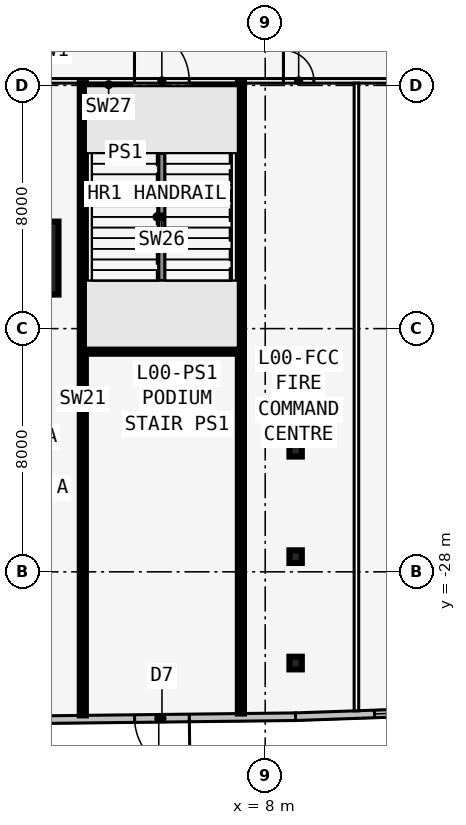
"""IFC4 building model, lengths in metres.
Left out: names, types, materials, properties, quantities, classifications, styles, units other than length and angle.
Written with IfcOpenShell. Run it as: python <this file> out.ifc"""

import sys

from ifc_helpers import new_model, si_unit, direction, frame, frame_2d, origin, origin_2d, place, context, subcontext, project, spatial, rectangle, i_section, extrude, element, fill, save


model = new_model("IFC4")
c1 = context("Model", 3, precision=1e-05, world=origin(), true_north=direction((0.0, 1.0)))
c2 = subcontext(c1, "Body", "Model", "MODEL_VIEW")
j1 = project(units=[si_unit("LENGTHUNIT", "METRE"), si_unit("PLANEANGLEUNIT", "RADIAN")], contexts=[c1])
p1 = place(None, origin())
s1 = spatial("IfcSite", under=j1, at=p1, CompositionType="ELEMENT")
p2 = place(p1, origin())
s2 = spatial("IfcBuilding", under=s1, at=p2, CompositionType="ELEMENT")
p3 = place(p2, origin())
s3 = spatial("IfcBuildingStorey", under=s2, at=p3, CompositionType="ELEMENT", Elevation=0.0)
p4 = place(p3, frame((5.0, -21.521, -0.3), z_axis=(0.0, 0.0, 1.0), x_axis=(0.0, -1.0, 0.0)))
e1 = element("IfcColumn", 1, at=p4, inside=s3, PredefinedType="COLUMN", context=c2, shape_type="SweptSolid", body=[
    extrude(i_section(OverallWidth=0.455, OverallDepth=0.569, WebThickness=0.078, FlangeThickness=0.125, at=origin_2d()), origin(), (0.0, 0.0, 1.0), 6.3),
])
for number, where, z_axis, x_axis in (
    (2, (9.0, -24.0, -0.3), (0.0, 0.0, 1.0), (1.0, 0.0, 0.0)),
    (3, (9.0, -27.5, -0.3), (0.0, 0.0, 1.0), (1.0, 0.0, 0.0)),
    (4, (9.0, -31.0, -0.3), (0.0, 0.0, 1.0), (1.0, 0.0, 0.0)),
):
    element("IfcColumn", number, at=place(p3, frame(where, z_axis=z_axis, x_axis=x_axis)), inside=s3, PredefinedType="COLUMN", context=c2, shape_type="SweptSolid", body=[
        extrude(i_section(OverallWidth=0.406, OverallDepth=0.417, WebThickness=0.03, FlangeThickness=0.048, at=origin_2d()), origin(), (0.0, 0.0, 1.0), 6.3),
    ])
p5 = place(p3, frame((0.0, -17.68, -0.3), z_axis=(0.0, 0.0, 1.0), x_axis=(0.0, -1.0, 0.0)))
e5 = element("IfcColumn", 5, at=p5, inside=s3, PredefinedType="COLUMN", context=c2, shape_type="SweptSolid", body=[
    extrude(rectangle(XDim=2.4, YDim=2.4, at=origin_2d()), origin(), (0.0, 0.0, 1.0), 6.3),
])
p6 = place(p3, frame((8.999, -32.765, -0.3), z_axis=(0.0, 0.0, 1.0), x_axis=(-0.999932292689, -0.011636581857, 0.0)))
e6 = element("IfcWall", 6, at=p6, inside=s3, PredefinedType="STANDARD", context=c2, shape_type="SweptSolid", body=[
    extrude(rectangle(XDim=9.0, YDim=0.25, at=frame_2d((4.5, 0.0))), origin(), (0.0, 0.0, 1.0), 6.05),
])
p7 = place(p6, frame((3.495, 0.0, 0.3)))
e7 = element("IfcOpeningElement", 7, at=p7, cuts=e6, PredefinedType="OPENING", context=c2, shape_type="SweptSolid", body=[
    extrude(rectangle(XDim=1.8, YDim=2.7, at=frame_2d((0.9, 1.35))), frame((0.0, 0.135, 0.0), z_axis=(0.0, -1.0, 0.0), x_axis=(1.0, 0.0, 0.0)), (0.0, 0.0, 1.0), 0.27),
])
p8 = place(p3, frame((8.996, -32.765, -0.3), z_axis=(0.0, 0.0, 1.0), x_axis=(0.999393961522, 0.034809620405, 0.0)))
e8 = element("IfcWall", 8, at=p8, inside=s3, PredefinedType="STANDARD", context=c2, shape_type="SweptSolid", body=[
    extrude(rectangle(XDim=9.005, YDim=0.25, at=frame_2d((4.503, 0.0))), origin(), (0.0, 0.0, 1.0), 6.05),
])
p9 = place(p8, frame((4.536, 0.0, 0.3)))
e9 = element("IfcOpeningElement", 9, at=p9, cuts=e8, PredefinedType="OPENING", context=c2, shape_type="SweptSolid", body=[
    extrude(rectangle(XDim=1.8, YDim=2.7, at=frame_2d((0.9, 1.35))), frame((0.0, 0.135, 0.0), z_axis=(0.0, -1.0, 0.0), x_axis=(1.0, 0.0, 0.0)), (0.0, 0.0, 1.0), 0.27),
])
p10 = place(p8, frame((2.602, 0.0, 1.2)))
e10 = element("IfcOpeningElement", 10, at=p10, cuts=e8, PredefinedType="OPENING", context=c2, shape_type="SweptSolid", body=[
    extrude(rectangle(XDim=1.2, YDim=3.6, at=frame_2d((0.6, 1.8))), frame((0.0, 0.135, 0.0), z_axis=(0.0, -1.0, 0.0), x_axis=(1.0, 0.0, 0.0)), (0.0, 0.0, 1.0), 0.27),
])
p11 = place(p8, frame((7.071, 0.0, 1.2)))
e11 = element("IfcOpeningElement", 11, at=p11, cuts=e8, PredefinedType="OPENING", context=c2, shape_type="SweptSolid", body=[
    extrude(rectangle(XDim=1.2, YDim=3.6, at=frame_2d((0.6, 1.8))), frame((0.0, 0.135, 0.0), z_axis=(0.0, -1.0, 0.0), x_axis=(1.0, 0.0, 0.0)), (0.0, 0.0, 1.0), 0.27),
])
p12 = place(p3, frame((-19.527, -11.851, -0.3), z_axis=(0.0, 0.0, 1.0), x_axis=(1.0, 0.0, 0.0)))
e12 = element("IfcWall", 12, at=p12, inside=s3, PredefinedType="PARTITIONING", context=c2, shape_type="SweptSolid", body=[
    extrude(rectangle(XDim=39.054, YDim=0.15, at=frame_2d((19.527, 0.0))), origin(), (0.0, 0.0, 1.0), 5.108),
])
p13 = place(p12, frame((8.427, 0.0, 0.3)))
e13 = element("IfcOpeningElement", 13, at=p13, cuts=e12, PredefinedType="OPENING", context=c2, shape_type="SweptSolid", body=[
    extrude(rectangle(XDim=1.8, YDim=2.13, at=frame_2d((0.9, 1.065))), frame((0.0, 0.085, 0.0), z_axis=(0.0, -1.0, 0.0), x_axis=(1.0, 0.0, 0.0)), (0.0, 0.0, 1.0), 0.17),
])
p14 = place(p12, frame((18.427, 0.0, 0.3)))
e14 = element("IfcOpeningElement", 14, at=p14, cuts=e12, PredefinedType="OPENING", context=c2, shape_type="SweptSolid", body=[
    extrude(rectangle(XDim=1.8, YDim=2.13, at=frame_2d((0.9, 1.065))), frame((0.0, 0.085, 0.0), z_axis=(0.0, -1.0, 0.0), x_axis=(1.0, 0.0, 0.0)), (0.0, 0.0, 1.0), 0.17),
])
p15 = place(p12, frame((23.227, 0.0, 0.3)))
e15 = element("IfcOpeningElement", 15, at=p15, cuts=e12, PredefinedType="OPENING", context=c2, shape_type="SweptSolid", body=[
    extrude(rectangle(XDim=1.8, YDim=2.13, at=frame_2d((0.9, 1.065))), frame((0.0, 0.085, 0.0), z_axis=(0.0, -1.0, 0.0), x_axis=(1.0, 0.0, 0.0)), (0.0, 0.0, 1.0), 0.17),
])
p16 = place(p12, frame((28.127, 0.0, 0.3)))
e16 = element("IfcOpeningElement", 16, at=p16, cuts=e12, PredefinedType="OPENING", context=c2, shape_type="SweptSolid", body=[
    extrude(rectangle(XDim=1.0, YDim=2.13, at=frame_2d((0.5, 1.065))), frame((0.0, 0.085, 0.0), z_axis=(0.0, -1.0, 0.0), x_axis=(1.0, 0.0, 0.0)), (0.0, 0.0, 1.0), 0.17),
])
p17 = place(p12, frame((33.74, 0.0, 0.3)))
e17 = element("IfcOpeningElement", 17, at=p17, cuts=e12, PredefinedType="OPENING", context=c2, shape_type="SweptSolid", body=[
    extrude(rectangle(XDim=1.8, YDim=2.13, at=frame_2d((0.9, 1.065))), frame((0.0, 0.085, 0.0), z_axis=(0.0, -1.0, 0.0), x_axis=(1.0, 0.0, 0.0)), (0.0, 0.0, 1.0), 0.17),
])
p18 = place(p3, frame((2.0, -11.926, -0.3), z_axis=(0.0, 0.0, 1.0), x_axis=(0.0, -1.0, 0.0)))
e18 = element("IfcWall", 18, at=p18, inside=s3, PredefinedType="SHEAR", context=c2, shape_type="SweptSolid", body=[
    extrude(rectangle(XDim=20.795, YDim=0.2, at=frame_2d((10.397, 0.0))), origin(), (0.0, 0.0, 1.0), 6.3),
])
p19 = place(p3, frame((7.2, -11.926, -0.3), z_axis=(0.0, 0.0, 1.0), x_axis=(0.0, -1.0, 0.0)))
e19 = element("IfcWall", 19, at=p19, inside=s3, PredefinedType="SHEAR", context=c2, shape_type="SweptSolid", body=[
    extrude(rectangle(XDim=20.734, YDim=0.2, at=frame_2d((10.367, 0.0))), origin(), (0.0, 0.0, 1.0), 6.3),
])
p20 = place(p3, frame((11.0, -11.926, -0.3), z_axis=(0.0, 0.0, 1.0), x_axis=(0.0, -1.0, 0.0)))
e20 = element("IfcWall", 20, at=p20, inside=s3, PredefinedType="PARTITIONING", context=c2, shape_type="SweptSolid", body=[
    extrude(rectangle(XDim=20.644, YDim=0.15, at=frame_2d((10.322, 0.0))), origin(), (0.0, 0.0, 1.0), 6.05),
])
p21 = place(p3, frame((20.027, -10.985, -0.3), z_axis=(0.0, 0.0, 1.0), x_axis=(-0.500001677587, 0.866024435227, 0.0)))
e21 = element("IfcWall", 21, at=p21, inside=s3, PredefinedType="PARTITIONING", context=c2, shape_type="SweptSolid", body=[
    extrude(rectangle(XDim=39.054, YDim=0.15, at=frame_2d((19.527, 0.0))), origin(), (0.0, 0.0, 1.0), 5.108),
])
p22 = place(p21, frame((8.427, 0.0, 0.3)))
e22 = element("IfcOpeningElement", 22, at=p22, cuts=e21, PredefinedType="OPENING", context=c2, shape_type="SweptSolid", body=[
    extrude(rectangle(XDim=1.8, YDim=2.13, at=frame_2d((0.9, 1.065))), frame((0.0, 0.085, 0.0), z_axis=(0.0, -1.0, 0.0), x_axis=(1.0, 0.0, 0.0)), (0.0, 0.0, 1.0), 0.17),
])
p23 = place(p21, frame((18.427, 0.0, 0.3)))
e23 = element("IfcOpeningElement", 23, at=p23, cuts=e21, PredefinedType="OPENING", context=c2, shape_type="SweptSolid", body=[
    extrude(rectangle(XDim=1.8, YDim=2.13, at=frame_2d((0.9, 1.065))), frame((0.0, 0.085, 0.0), z_axis=(0.0, -1.0, 0.0), x_axis=(1.0, 0.0, 0.0)), (0.0, 0.0, 1.0), 0.17),
])
p24 = place(p21, frame((23.227, 0.0, 0.3)))
e24 = element("IfcOpeningElement", 24, at=p24, cuts=e21, PredefinedType="OPENING", context=c2, shape_type="SweptSolid", body=[
    extrude(rectangle(XDim=1.8, YDim=2.13, at=frame_2d((0.9, 1.065))), frame((0.0, 0.085, 0.0), z_axis=(0.0, -1.0, 0.0), x_axis=(1.0, 0.0, 0.0)), (0.0, 0.0, 1.0), 0.17),
])
p25 = place(p21, frame((27.627, 0.0, 0.3)))
e25 = element("IfcOpeningElement", 25, at=p25, cuts=e21, PredefinedType="OPENING", context=c2, shape_type="SweptSolid", body=[
    extrude(rectangle(XDim=1.0, YDim=2.13, at=frame_2d((0.5, 1.065))), frame((0.0, 0.085, 0.0), z_axis=(0.0, -1.0, 0.0), x_axis=(1.0, 0.0, 0.0)), (0.0, 0.0, 1.0), 0.17),
])
p26 = place(p21, frame((30.527, 0.0, 0.3)))
e26 = element("IfcOpeningElement", 26, at=p26, cuts=e21, PredefinedType="OPENING", context=c2, shape_type="SweptSolid", body=[
    extrude(rectangle(XDim=1.0, YDim=2.13, at=frame_2d((0.5, 1.065))), frame((0.0, 0.085, 0.0), z_axis=(0.0, -1.0, 0.0), x_axis=(1.0, 0.0, 0.0)), (0.0, 0.0, 1.0), 0.17),
])
p27 = place(p21, frame((33.277, 0.0, 0.3)))
e27 = element("IfcOpeningElement", 27, at=p27, cuts=e21, PredefinedType="OPENING", context=c2, shape_type="SweptSolid", body=[
    extrude(rectangle(XDim=1.0, YDim=2.13, at=frame_2d((0.5, 1.065))), frame((0.0, 0.085, 0.0), z_axis=(0.0, -1.0, 0.0), x_axis=(1.0, 0.0, 0.0)), (0.0, 0.0, 1.0), 0.17),
])
p28 = place(p21, frame((36.39, 0.0, 0.3)))
e28 = element("IfcOpeningElement", 28, at=p28, cuts=e21, PredefinedType="OPENING", context=c2, shape_type="SweptSolid", body=[
    extrude(rectangle(XDim=1.0, YDim=2.13, at=frame_2d((0.5, 1.065))), frame((0.0, 0.085, 0.0), z_axis=(0.0, -1.0, 0.0), x_axis=(1.0, 0.0, 0.0)), (0.0, 0.0, 1.0), 0.17),
])
p29 = place(p3, frame((2.0, -20.726, -0.3), z_axis=(0.0, 0.0, 1.0), x_axis=(1.0, 0.0, 0.0)))
e29 = element("IfcWall", 29, at=p29, inside=s3, PredefinedType="SHEAR", context=c2, shape_type="SweptSolid", body=[
    extrude(rectangle(XDim=5.2, YDim=0.2, at=frame_2d((2.6, 0.0))), origin(), (0.0, 0.0, 1.0), 6.3),
])
for number, where, z_axis, x_axis in (
    (30, (2.1, -11.976, -0.3), (0.0, 0.0, 1.0), (1.0, 0.0, 0.0)),
    (31, (5.6, -11.976, -0.3), (0.0, 0.0, 1.0), (1.0, 0.0, 0.0)),
):
    element("IfcWall", number, at=place(p3, frame(where, z_axis=z_axis, x_axis=x_axis)), inside=s3, PredefinedType="SOLIDWALL", context=c2, shape_type="SweptSolid", body=[
        extrude(rectangle(XDim=1.5, YDim=0.1, at=frame_2d((0.75, 0.0))), origin(), (0.0, 0.0, 1.0), 6.3),
    ])
p30 = place(p3, frame((4.6, -14.229, 0.0), z_axis=(0.0, 0.0, 1.0), x_axis=(0.0, -1.0, 0.0)))
e32 = element("IfcWall", 32, at=p30, inside=s3, PredefinedType="SOLIDWALL", context=c2, shape_type="SweptSolid", body=[
    extrude(rectangle(XDim=4.194, YDim=0.2, at=frame_2d((2.097, 0.0))), origin(), (0.0, 0.0, 1.0), 6.0),
])
p31 = place(p7, origin())
e33 = element("IfcDoor", 33, at=p31, inside=s3, OperationType="DOUBLE_DOOR_SINGLE_SWING", PredefinedType="DOOR", context=c2, shape_type="SweptSolid", body=[
    extrude(rectangle(XDim=1.8, YDim=2.7, at=frame_2d((0.9, 1.35))), frame((0.0, 0.025, 0.0), z_axis=(0.0, -1.0, 0.0), x_axis=(1.0, 0.0, 0.0)), (0.0, 0.0, 1.0), 0.05),
])
fill(e7, e33)
p32 = place(p10, origin())
e34 = element("IfcWindow", 34, at=p32, inside=s3, PartitioningType="SINGLE_PANEL", PredefinedType="WINDOW", context=c2, shape_type="SweptSolid", body=[
    extrude(rectangle(XDim=1.2, YDim=3.6, at=frame_2d((0.6, 1.8))), frame((0.0, 0.03, 0.0), z_axis=(0.0, -1.0, 0.0), x_axis=(1.0, 0.0, 0.0)), (0.0, 0.0, 1.0), 0.06),
])
fill(e10, e34)
p33 = place(p15, origin())
e35 = element("IfcDoor", 35, at=p33, inside=s3, OperationType="DOUBLE_DOOR_SINGLE_SWING", PredefinedType="DOOR", context=c2, shape_type="SweptSolid", body=[
    extrude(rectangle(XDim=1.8, YDim=2.13, at=frame_2d((0.9, 1.065))), frame((0.0, 0.025, 0.0), z_axis=(0.0, -1.0, 0.0), x_axis=(1.0, 0.0, 0.0)), (0.0, 0.0, 1.0), 0.05),
])
fill(e15, e35)
p34 = place(p16, origin())
e36 = element("IfcDoor", 36, at=p34, inside=s3, OperationType="SINGLE_SWING_LEFT", PredefinedType="DOOR", context=c2, shape_type="SweptSolid", body=[
    extrude(rectangle(XDim=1.0, YDim=2.13, at=frame_2d((0.5, 1.065))), frame((0.0, 0.025, 0.0), z_axis=(0.0, -1.0, 0.0), x_axis=(1.0, 0.0, 0.0)), (0.0, 0.0, 1.0), 0.05),
])
fill(e16, e36)
save(model, sys.argv[1])
